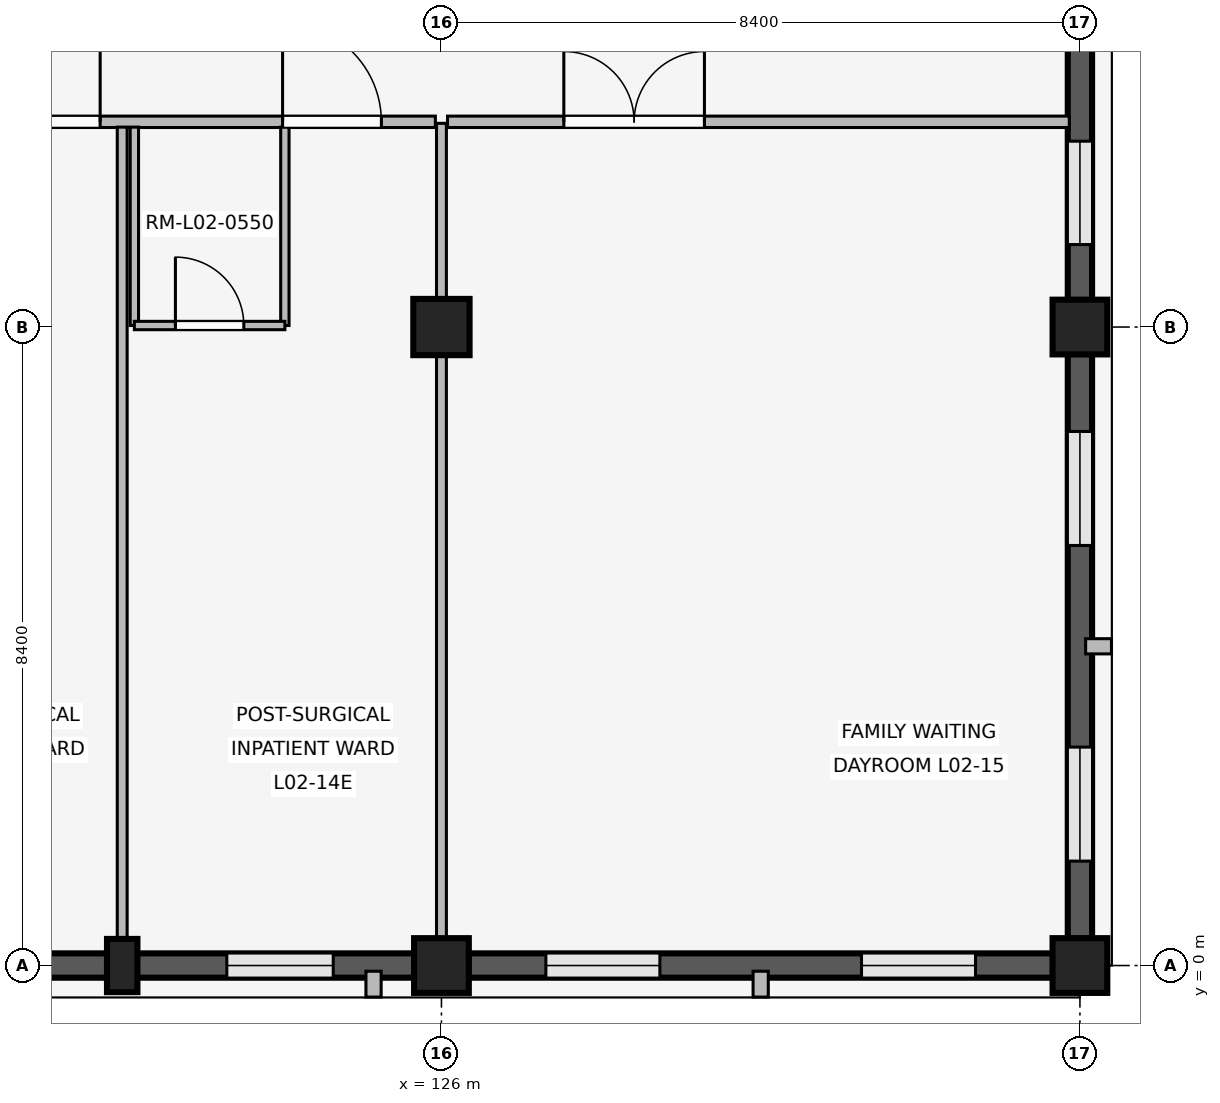
"""IFC4 building model, lengths in metres.
Left out: names, types, materials, properties, quantities, classifications, styles, units other than length and angle.
Written with IfcOpenShell. Run it as: python <this file> out.ifc"""

import sys

from ifc_helpers import new_model, si_unit, direction, frame, frame_2d, origin, origin_2d, place, context, subcontext, project, spatial, rectangle, extrude, element, fill, save


model = new_model("IFC4")
c1 = context("Model", 3, precision=1e-05, world=origin(), true_north=direction((0.0, 1.0)))
c2 = subcontext(c1, "Body", "Model", "MODEL_VIEW")
j1 = project(units=[si_unit("LENGTHUNIT", "METRE"), si_unit("PLANEANGLEUNIT", "RADIAN")], contexts=[c1])
p1 = place(None, origin())
s1 = spatial("IfcSite", under=j1, at=p1, CompositionType="ELEMENT")
p2 = place(p1, origin())
s2 = spatial("IfcBuilding", under=s1, at=p2, CompositionType="ELEMENT")
p3 = place(p2, frame((0.0, 0.0, 8.1)))
s3 = spatial("IfcBuildingStorey", under=s2, at=p3, CompositionType="ELEMENT", Elevation=8.1)
p4 = place(p3, frame((126.0, 0.0, 0.0), z_axis=(0.0, 0.0, 1.0), x_axis=(1.0, 0.0, 0.0)))
e1 = element("IfcColumn", 1, at=p4, inside=s3, PredefinedType="COLUMN", context=c2, shape_type="SweptSolid", body=[
    extrude(rectangle(XDim=0.72, YDim=0.72, at=origin_2d()), origin(), (0.0, 0.0, 1.0), 4.8),
])
p5 = place(p3, frame((126.0, 8.4, 0.0), z_axis=(0.0, 0.0, 1.0), x_axis=(1.0, 0.0, 0.0)))
e2 = element("IfcColumn", 2, at=p5, inside=s3, PredefinedType="COLUMN", context=c2, shape_type="SweptSolid", body=[
    extrude(rectangle(XDim=0.74, YDim=0.74, at=origin_2d()), origin(), (0.0, 0.0, 1.0), 4.8),
])
for number, where, z_axis, x_axis in (
    (3, (134.4, 0.0, 0.0), (0.0, 0.0, 1.0), (1.0, 0.0, 0.0)),
    (4, (134.4, 8.4, 0.0), (0.0, 0.0, 1.0), (1.0, 0.0, 0.0)),
):
    element("IfcColumn", number, at=place(p3, frame(where, z_axis=z_axis, x_axis=x_axis)), inside=s3, PredefinedType="COLUMN", context=c2, shape_type="SweptSolid", body=[
        extrude(rectangle(XDim=0.72, YDim=0.72, at=origin_2d()), origin(), (0.0, 0.0, 1.0), 4.8),
    ])
p6 = place(p3, frame((121.8, 0.0, 0.0), z_axis=(0.0, 0.0, 1.0), x_axis=(1.0, 0.0, 0.0)))
e5 = element("IfcColumn", 5, at=p6, inside=s3, PredefinedType="PILASTER", context=c2, shape_type="SweptSolid", body=[
    extrude(rectangle(XDim=0.4, YDim=0.7, at=origin_2d()), origin(), (0.0, 0.0, 1.0), 4.8),
])
p7 = place(p3, frame((125.645, 0.0, 0.0), z_axis=(0.0, 0.0, 1.0), x_axis=(-1.0, 0.0, 0.0)))
e6 = element("IfcWall", 6, at=p7, inside=s3, PredefinedType="SOLIDWALL", context=c2, shape_type="SweptSolid", body=[
    extrude(rectangle(XDim=7.69, YDim=0.32, at=frame_2d((3.845, 0.0))), origin(), (0.0, 0.0, 1.0), 3.86),
])
p8 = place(p7, frame((1.069, 0.0, 0.85)))
e7 = element("IfcOpeningElement", 7, at=p8, cuts=e6, PredefinedType="OPENING", context=c2, shape_type="SweptSolid", body=[
    extrude(rectangle(XDim=1.4, YDim=1.4, at=frame_2d((0.7, 0.7))), frame((0.0, 0.17, 0.0), z_axis=(0.0, -1.0, 0.0), x_axis=(1.0, 0.0, 0.0)), (0.0, 0.0, 1.0), 0.34),
])
p9 = place(p7, frame((5.221, 0.0, 0.85)))
e8 = element("IfcOpeningElement", 8, at=p9, cuts=e6, PredefinedType="OPENING", context=c2, shape_type="SweptSolid", body=[
    extrude(rectangle(XDim=1.4, YDim=1.4, at=frame_2d((0.7, 0.7))), frame((0.0, 0.17, 0.0), z_axis=(0.0, -1.0, 0.0), x_axis=(1.0, 0.0, 0.0)), (0.0, 0.0, 1.0), 0.34),
])
p10 = place(p3, frame((125.107, -0.075, 0.0), z_axis=(0.0, 0.0, 1.0), x_axis=(0.0, -1.0, 0.0)))
e9 = element("IfcWall", 9, at=p10, inside=s3, PredefinedType="ELEMENTEDWALL", context=c2, shape_type="SweptSolid", body=[
    extrude(rectangle(XDim=0.34, YDim=0.2, at=frame_2d((0.17, 0.0))), origin(), (0.0, 0.0, 1.0), 3.84),
])
p11 = place(p3, frame((134.045, 0.0, 0.0), z_axis=(0.0, 0.0, 1.0), x_axis=(-1.0, 0.0, 0.0)))
e10 = element("IfcWall", 10, at=p11, inside=s3, PredefinedType="SOLIDWALL", context=c2, shape_type="SweptSolid", body=[
    extrude(rectangle(XDim=7.69, YDim=0.32, at=frame_2d((3.845, 0.0))), origin(), (0.0, 0.0, 1.0), 3.86),
])
p12 = place(p11, frame((1.019, 0.0, 0.85)))
e11 = element("IfcOpeningElement", 11, at=p12, cuts=e10, PredefinedType="OPENING", context=c2, shape_type="SweptSolid", body=[
    extrude(rectangle(XDim=1.5, YDim=1.55, at=frame_2d((0.75, 0.775))), frame((0.0, 0.17, 0.0), z_axis=(0.0, -1.0, 0.0), x_axis=(1.0, 0.0, 0.0)), (0.0, 0.0, 1.0), 0.34),
])
p13 = place(p11, frame((5.171, 0.0, 0.85)))
e12 = element("IfcOpeningElement", 12, at=p13, cuts=e10, PredefinedType="OPENING", context=c2, shape_type="SweptSolid", body=[
    extrude(rectangle(XDim=1.5, YDim=1.55, at=frame_2d((0.75, 0.775))), frame((0.0, 0.17, 0.0), z_axis=(0.0, -1.0, 0.0), x_axis=(1.0, 0.0, 0.0)), (0.0, 0.0, 1.0), 0.34),
])
p14 = place(p3, frame((130.2, -0.075, 0.0), z_axis=(0.0, 0.0, 1.0), x_axis=(0.0, -1.0, 0.0)))
e13 = element("IfcWall", 13, at=p14, inside=s3, PredefinedType="ELEMENTEDWALL", context=c2, shape_type="SweptSolid", body=[
    extrude(rectangle(XDim=0.34, YDim=0.2, at=frame_2d((0.17, 0.0))), origin(), (0.0, 0.0, 1.0), 3.84),
])
p15 = place(p3, frame((134.4, 8.045, 0.0), z_axis=(0.0, 0.0, 1.0), x_axis=(0.0, -1.0, 0.0)))
e14 = element("IfcWall", 14, at=p15, inside=s3, PredefinedType="SOLIDWALL", context=c2, shape_type="SweptSolid", body=[
    extrude(rectangle(XDim=7.69, YDim=0.32, at=frame_2d((3.845, 0.0))), origin(), (0.0, 0.0, 1.0), 3.86),
])
p16 = place(p15, frame((1.019, 0.0, 0.85)))
e15 = element("IfcOpeningElement", 15, at=p16, cuts=e14, PredefinedType="OPENING", context=c2, shape_type="SweptSolid", body=[
    extrude(rectangle(XDim=1.5, YDim=1.55, at=frame_2d((0.75, 0.775))), frame((0.0, 0.17, 0.0), z_axis=(0.0, -1.0, 0.0), x_axis=(1.0, 0.0, 0.0)), (0.0, 0.0, 1.0), 0.34),
])
p17 = place(p15, frame((5.171, 0.0, 0.85)))
e16 = element("IfcOpeningElement", 16, at=p17, cuts=e14, PredefinedType="OPENING", context=c2, shape_type="SweptSolid", body=[
    extrude(rectangle(XDim=1.5, YDim=1.55, at=frame_2d((0.75, 0.775))), frame((0.0, 0.17, 0.0), z_axis=(0.0, -1.0, 0.0), x_axis=(1.0, 0.0, 0.0)), (0.0, 0.0, 1.0), 0.34),
])
p18 = place(p3, frame((134.475, 4.2, 0.0), z_axis=(0.0, 0.0, 1.0), x_axis=(1.0, 0.0, 0.0)))
e17 = element("IfcWall", 17, at=p18, inside=s3, PredefinedType="ELEMENTEDWALL", context=c2, shape_type="SweptSolid", body=[
    extrude(rectangle(XDim=0.34, YDim=0.2, at=frame_2d((0.17, 0.0))), origin(), (0.0, 0.0, 1.0), 3.84),
])
p19 = place(p3, frame((134.4, 16.445, 0.0), z_axis=(0.0, 0.0, 1.0), x_axis=(0.0, -1.0, 0.0)))
e18 = element("IfcWall", 18, at=p19, inside=s3, PredefinedType="SOLIDWALL", context=c2, shape_type="SweptSolid", body=[
    extrude(rectangle(XDim=7.69, YDim=0.32, at=frame_2d((3.845, 0.0))), origin(), (0.0, 0.0, 1.0), 3.86),
])
p20 = place(p19, frame((0.73, 0.0, 0.85)))
e19 = element("IfcOpeningElement", 19, at=p20, cuts=e18, PredefinedType="OPENING", context=c2, shape_type="SweptSolid", body=[
    extrude(rectangle(XDim=1.36, YDim=1.42, at=frame_2d((0.68, 0.71))), frame((0.0, 0.17, 0.0), z_axis=(0.0, -1.0, 0.0), x_axis=(1.0, 0.0, 0.0)), (0.0, 0.0, 1.0), 0.34),
])
p21 = place(p19, frame((5.6, 0.0, 0.85)))
e20 = element("IfcOpeningElement", 20, at=p21, cuts=e18, PredefinedType="OPENING", context=c2, shape_type="SweptSolid", body=[
    extrude(rectangle(XDim=1.36, YDim=1.42, at=frame_2d((0.68, 0.71))), frame((0.0, 0.17, 0.0), z_axis=(0.0, -1.0, 0.0), x_axis=(1.0, 0.0, 0.0)), (0.0, 0.0, 1.0), 0.34),
])
p22 = place(p3, frame((117.68, 11.1, 0.0), z_axis=(0.0, 0.0, 1.0), x_axis=(1.0, 0.0, 0.0)))
e21 = element("IfcWall", 21, at=p22, inside=s3, PredefinedType="PARTITIONING", context=c2, shape_type="SweptSolid", body=[
    extrude(rectangle(XDim=8.24, YDim=0.15, at=frame_2d((4.12, 0.0))), origin(), (0.0, 0.0, 1.0), 3.84),
])
p23 = place(p22, frame((2.53, 0.0, 0.0)))
e22 = element("IfcOpeningElement", 22, at=p23, cuts=e21, PredefinedType="OPENING", context=c2, shape_type="SweptSolid", body=[
    extrude(rectangle(XDim=1.3, YDim=2.25, at=frame_2d((0.65, 1.125))), frame((0.0, 0.085, 0.0), z_axis=(0.0, -1.0, 0.0), x_axis=(1.0, 0.0, 0.0)), (0.0, 0.0, 1.0), 0.17),
])
p24 = place(p22, frame((6.23, 0.0, 0.0)))
e23 = element("IfcOpeningElement", 23, at=p24, cuts=e21, PredefinedType="OPENING", context=c2, shape_type="SweptSolid", body=[
    extrude(rectangle(XDim=1.3, YDim=2.25, at=frame_2d((0.65, 1.125))), frame((0.0, 0.085, 0.0), z_axis=(0.0, -1.0, 0.0), x_axis=(1.0, 0.0, 0.0)), (0.0, 0.0, 1.0), 0.17),
])
p25 = place(p3, frame((121.8, 0.1, 0.0), z_axis=(0.0, 0.0, 1.0), x_axis=(0.0, 1.0, 0.0)))
e24 = element("IfcWall", 24, at=p25, inside=s3, PredefinedType="PARTITIONING", context=c2, shape_type="SweptSolid", body=[
    extrude(rectangle(XDim=10.93, YDim=0.13, at=frame_2d((5.465, 0.0))), origin(), (0.0, 0.0, 1.0), 3.84),
])
for number, where, z_axis, x_axis in (
    (25, (121.96, 8.42, 0.0), (0.0, 0.0, 1.0), (0.0, 1.0, 0.0)),
    (26, (123.94, 8.42, 0.0), (0.0, 0.0, 1.0), (0.0, 1.0, 0.0)),
):
    element("IfcWall", number, at=place(p3, frame(where, z_axis=z_axis, x_axis=x_axis)), inside=s3, PredefinedType="PARTITIONING", context=c2, shape_type="SweptSolid", body=[
        extrude(rectangle(XDim=2.61, YDim=0.11, at=frame_2d((1.305, 0.0))), origin(), (0.0, 0.0, 1.0), 3.84),
    ])
p26 = place(p3, frame((121.96, 8.42, 0.0), z_axis=(0.0, 0.0, 1.0), x_axis=(1.0, 0.0, 0.0)))
e27 = element("IfcWall", 27, at=p26, inside=s3, PredefinedType="PARTITIONING", context=c2, shape_type="SweptSolid", body=[
    extrude(rectangle(XDim=1.98, YDim=0.11, at=frame_2d((0.99, 0.0))), origin(), (0.0, 0.0, 1.0), 3.84),
])
p27 = place(p26, frame((0.54, 0.0, 0.0)))
e28 = element("IfcOpeningElement", 28, at=p27, cuts=e27, PredefinedType="OPENING", context=c2, shape_type="SweptSolid", body=[
    extrude(rectangle(XDim=0.9, YDim=2.1, at=frame_2d((0.45, 1.05))), frame((0.0, 0.065, 0.0), z_axis=(0.0, -1.0, 0.0), x_axis=(1.0, 0.0, 0.0)), (0.0, 0.0, 1.0), 0.13),
])
p28 = place(p3, frame((126.0, 0.14, 0.0), z_axis=(0.0, 0.0, 1.0), x_axis=(0.0, 1.0, 0.0)))
e29 = element("IfcWall", 29, at=p28, inside=s3, PredefinedType="PARTITIONING", context=c2, shape_type="SweptSolid", body=[
    extrude(rectangle(XDim=10.94, YDim=0.13, at=frame_2d((5.47, 0.0))), origin(), (0.0, 0.0, 1.0), 3.84),
])
p29 = place(p3, frame((126.08, 11.1, 0.0), z_axis=(0.0, 0.0, 1.0), x_axis=(1.0, 0.0, 0.0)))
e30 = element("IfcWall", 30, at=p29, inside=s3, PredefinedType="PARTITIONING", context=c2, shape_type="SweptSolid", body=[
    extrude(rectangle(XDim=8.18, YDim=0.15, at=frame_2d((4.09, 0.0))), origin(), (0.0, 0.0, 1.0), 3.84),
])
p30 = place(p29, frame((1.53, 0.0, 0.0)))
e31 = element("IfcOpeningElement", 31, at=p30, cuts=e30, PredefinedType="OPENING", context=c2, shape_type="SweptSolid", body=[
    extrude(rectangle(XDim=1.85, YDim=2.3, at=frame_2d((0.925, 1.15))), frame((0.0, 0.085, 0.0), z_axis=(0.0, -1.0, 0.0), x_axis=(1.0, 0.0, 0.0)), (0.0, 0.0, 1.0), 0.17),
])
p31 = place(p8, origin())
e32 = element("IfcWindow", 32, at=p31, inside=s3, PartitioningType="SINGLE_PANEL", PredefinedType="WINDOW", context=c2, shape_type="SweptSolid", body=[
    extrude(rectangle(XDim=1.4, YDim=1.4, at=frame_2d((0.7, 0.7))), frame((0.0, 0.03, 0.0), z_axis=(0.0, -1.0, 0.0), x_axis=(1.0, 0.0, 0.0)), (0.0, 0.0, 1.0), 0.06),
])
fill(e7, e32)
p32 = place(p12, origin())
e33 = element("IfcWindow", 33, at=p32, inside=s3, PartitioningType="SINGLE_PANEL", PredefinedType="WINDOW", context=c2, shape_type="SweptSolid", body=[
    extrude(rectangle(XDim=1.5, YDim=1.55, at=frame_2d((0.75, 0.775))), frame((0.0, 0.03, 0.0), z_axis=(0.0, -1.0, 0.0), x_axis=(1.0, 0.0, 0.0)), (0.0, 0.0, 1.0), 0.06),
])
fill(e11, e33)
p33 = place(p13, origin())
e34 = element("IfcWindow", 34, at=p33, inside=s3, PartitioningType="SINGLE_PANEL", PredefinedType="WINDOW", context=c2, shape_type="SweptSolid", body=[
    extrude(rectangle(XDim=1.5, YDim=1.55, at=frame_2d((0.75, 0.775))), frame((0.0, 0.03, 0.0), z_axis=(0.0, -1.0, 0.0), x_axis=(1.0, 0.0, 0.0)), (0.0, 0.0, 1.0), 0.06),
])
fill(e12, e34)
p34 = place(p16, origin())
e35 = element("IfcWindow", 35, at=p34, inside=s3, PartitioningType="SINGLE_PANEL", PredefinedType="WINDOW", context=c2, shape_type="SweptSolid", body=[
    extrude(rectangle(XDim=1.5, YDim=1.55, at=frame_2d((0.75, 0.775))), frame((0.0, 0.03, 0.0), z_axis=(0.0, -1.0, 0.0), x_axis=(1.0, 0.0, 0.0)), (0.0, 0.0, 1.0), 0.06),
])
fill(e15, e35)
p35 = place(p17, origin())
e36 = element("IfcWindow", 36, at=p35, inside=s3, PartitioningType="SINGLE_PANEL", PredefinedType="WINDOW", context=c2, shape_type="SweptSolid", body=[
    extrude(rectangle(XDim=1.5, YDim=1.55, at=frame_2d((0.75, 0.775))), frame((0.0, 0.03, 0.0), z_axis=(0.0, -1.0, 0.0), x_axis=(1.0, 0.0, 0.0)), (0.0, 0.0, 1.0), 0.06),
])
fill(e16, e36)
p36 = place(p21, origin())
e37 = element("IfcWindow", 37, at=p36, inside=s3, PartitioningType="SINGLE_PANEL", PredefinedType="WINDOW", context=c2, shape_type="SweptSolid", body=[
    extrude(rectangle(XDim=1.36, YDim=1.42, at=frame_2d((0.68, 0.71))), frame((0.0, 0.03, 0.0), z_axis=(0.0, -1.0, 0.0), x_axis=(1.0, 0.0, 0.0)), (0.0, 0.0, 1.0), 0.06),
])
fill(e20, e37)
p37 = place(p23, origin())
e38 = element("IfcDoor", 38, at=p37, inside=s3, OperationType="SINGLE_SWING_RIGHT", PredefinedType="DOOR", context=c2, shape_type="SweptSolid", body=[
    extrude(rectangle(XDim=1.3, YDim=2.25, at=frame_2d((0.65, 1.125))), frame((0.0, 0.025, 0.0), z_axis=(0.0, -1.0, 0.0), x_axis=(1.0, 0.0, 0.0)), (0.0, 0.0, 1.0), 0.05),
])
fill(e22, e38)
p38 = place(p24, origin())
e39 = element("IfcDoor", 39, at=p38, inside=s3, OperationType="SINGLE_SWING_LEFT", PredefinedType="DOOR", context=c2, shape_type="SweptSolid", body=[
    extrude(rectangle(XDim=1.3, YDim=2.25, at=frame_2d((0.65, 1.125))), frame((0.0, 0.025, 0.0), z_axis=(0.0, -1.0, 0.0), x_axis=(1.0, 0.0, 0.0)), (0.0, 0.0, 1.0), 0.05),
])
fill(e23, e39)
p39 = place(p27, origin())
e40 = element("IfcDoor", 40, at=p39, inside=s3, OperationType="SINGLE_SWING_LEFT", PredefinedType="DOOR", context=c2, shape_type="SweptSolid", body=[
    extrude(rectangle(XDim=0.9, YDim=2.1, at=frame_2d((0.45, 1.05))), frame((0.0, 0.025, 0.0), z_axis=(0.0, -1.0, 0.0), x_axis=(1.0, 0.0, 0.0)), (0.0, 0.0, 1.0), 0.05),
])
fill(e28, e40)
p40 = place(p30, origin())
e41 = element("IfcDoor", 41, at=p40, inside=s3, OperationType="DOUBLE_SWING_LEFT", PredefinedType="DOOR", context=c2, shape_type="SweptSolid", body=[
    extrude(rectangle(XDim=1.85, YDim=2.3, at=frame_2d((0.925, 1.15))), frame((0.0, 0.025, 0.0), z_axis=(0.0, -1.0, 0.0), x_axis=(1.0, 0.0, 0.0)), (0.0, 0.0, 1.0), 0.05),
])
fill(e31, e41)
save(model, sys.argv[1])
